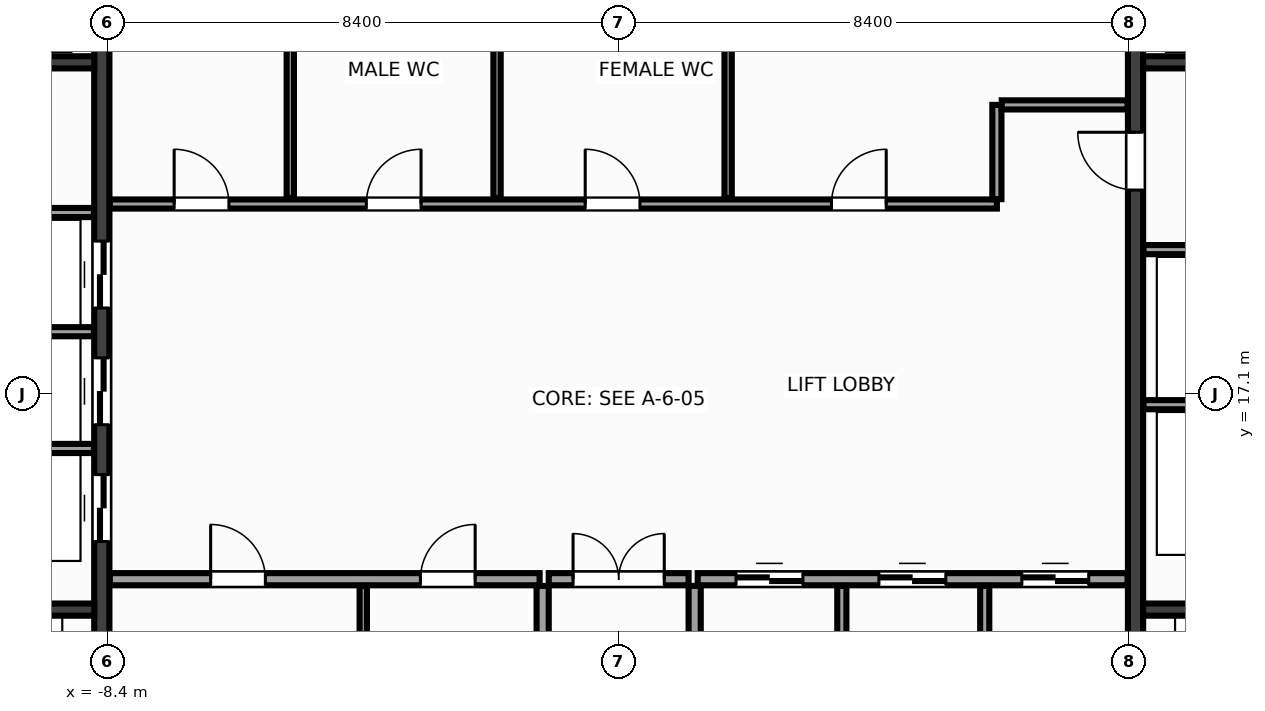
"""IFC4 building model, lengths in metres.
Left out: names, types, materials, properties, quantities, classifications, styles, units other than length and angle.
Written with IfcOpenShell. Run it as: python <this file> out.ifc"""

import sys

from ifc_helpers import new_model, si_unit, direction, frame, frame_2d, origin, place, context, subcontext, project, spatial, rectangle, extrude, source, transform, mapped, element, fill, save


model = new_model("IFC4")
c1 = context("Model", 3, precision=1e-05, world=origin(), true_north=direction((0.0, 1.0)))
c2 = subcontext(c1, "Body", "Model", "MODEL_VIEW")
j1 = project(units=[si_unit("LENGTHUNIT", "METRE"), si_unit("PLANEANGLEUNIT", "RADIAN")], contexts=[c1])
p1 = place(None, origin())
s1 = spatial("IfcSite", under=j1, at=p1, CompositionType="ELEMENT")
p2 = place(p1, origin())
s2 = spatial("IfcBuilding", under=s1, at=p2, CompositionType="ELEMENT")
p3 = place(p2, frame((0.0, 0.0, 160.4)))
s3 = spatial("IfcBuildingStorey", under=s2, at=p3, CompositionType="ELEMENT", Elevation=160.4)
m1 = source(origin(), c2, "Body", "SweptSolid", [
    extrude(rectangle(XDim=12.95, YDim=0.25, at=frame_2d((6.475, 0.0))), origin(), (0.0, 0.0, 1.0), 3.6),
])
p4 = place(p3, frame((-8.5, 10.525, 0.0), z_axis=(0.0, 0.0, 1.0), x_axis=(0.0, 1.0, 0.0)))
e1 = element("IfcWall", 1, at=p4, inside=s3, PredefinedType="SHEAR", context=c2, shape_type="MappedRepresentation", body=[
    mapped(m1, transform((0.0, 0.0, 0.0), x_axis=(1.0, 0.0, 0.0), y_axis=(0.0, 1.0, 0.0), z_axis=(0.0, 0.0, 1.0), scale=1.0)),
])
p5 = place(p4, frame((4.145, 0.0, 0.0)))
e2 = element("IfcOpeningElement", 2, at=p5, cuts=e1, PredefinedType="OPENING", context=c2, shape_type="SweptSolid", body=[
    extrude(rectangle(XDim=1.1, YDim=2.15, at=frame_2d((0.55, 1.075))), frame((0.0, 0.137, 0.0), z_axis=(0.0, -1.0, 0.0), x_axis=(1.0, 0.0, 0.0)), (0.0, 0.0, 1.0), 0.274),
])
p6 = place(p4, frame((6.065, 0.0, 0.0)))
e3 = element("IfcOpeningElement", 3, at=p6, cuts=e1, PredefinedType="OPENING", context=c2, shape_type="SweptSolid", body=[
    extrude(rectangle(XDim=1.1, YDim=2.15, at=frame_2d((0.55, 1.075))), frame((0.0, 0.137, 0.0), z_axis=(0.0, -1.0, 0.0), x_axis=(1.0, 0.0, 0.0)), (0.0, 0.0, 1.0), 0.274),
])
p7 = place(p4, frame((7.985, 0.0, 0.0)))
e4 = element("IfcOpeningElement", 4, at=p7, cuts=e1, PredefinedType="OPENING", context=c2, shape_type="SweptSolid", body=[
    extrude(rectangle(XDim=1.1, YDim=2.15, at=frame_2d((0.55, 1.075))), frame((0.0, 0.137, 0.0), z_axis=(0.0, -1.0, 0.0), x_axis=(1.0, 0.0, 0.0)), (0.0, 0.0, 1.0), 0.274),
])
p8 = place(p3, frame((8.5, 10.525, 0.0), z_axis=(0.0, 0.0, 1.0), x_axis=(0.0, 1.0, 0.0)))
e5 = element("IfcWall", 5, at=p8, inside=s3, PredefinedType="SHEAR", context=c2, shape_type="MappedRepresentation", body=[
    mapped(m1, transform((0.0, 0.0, 0.0), x_axis=(1.0, 0.0, 0.0), y_axis=(0.0, 1.0, 0.0), z_axis=(0.0, 0.0, 1.0), scale=1.0)),
])
p9 = place(p8, frame((9.925, 0.0, 0.0)))
e6 = element("IfcOpeningElement", 6, at=p9, cuts=e5, PredefinedType="OPENING", context=c2, shape_type="SweptSolid", body=[
    extrude(rectangle(XDim=0.95, YDim=2.15, at=frame_2d((0.475, 1.075))), frame((0.0, 0.137, 0.0), z_axis=(0.0, -1.0, 0.0), x_axis=(1.0, 0.0, 0.0)), (0.0, 0.0, 1.0), 0.274),
])
m2 = source(origin(), c2, "Body", "SweptSolid", [
    extrude(rectangle(XDim=2.825, YDim=0.2, at=frame_2d((1.413, 0.0))), origin(), (0.0, 0.0, 1.0), 3.6),
])
for number, where, z_axis, x_axis in (
    (7, (-11.45, 13.55, 0.0), (0.0, 0.0, 1.0), (1.0, 0.0, 0.0)),
    (8, (8.625, 13.55, 0.0), (0.0, 0.0, 1.0), (1.0, 0.0, 0.0)),
):
    element("IfcWall", number, at=place(p3, frame(where, z_axis=z_axis, x_axis=x_axis)), inside=s3, PredefinedType="SHEAR", context=c2, shape_type="MappedRepresentation", body=[
        mapped(m2, transform((0.0, 0.0, 0.0), x_axis=(1.0, 0.0, 0.0), y_axis=(0.0, 1.0, 0.0), z_axis=(0.0, 0.0, 1.0), scale=1.0)),
    ])
m3 = source(origin(), c2, "Body", "SweptSolid", [
    extrude(rectangle(XDim=3.02, YDim=0.2, at=frame_2d((1.51, 0.0))), origin(), (0.0, 0.0, 1.0), 3.6),
])
for number, where, z_axis, x_axis in (
    (9, (-11.645, 22.55, 0.0), (0.0, 0.0, 1.0), (1.0, 0.0, 0.0)),
    (10, (8.625, 22.55, 0.0), (0.0, 0.0, 1.0), (1.0, 0.0, 0.0)),
):
    element("IfcWall", number, at=place(p3, frame(where, z_axis=z_axis, x_axis=x_axis)), inside=s3, PredefinedType="SHEAR", context=c2, shape_type="MappedRepresentation", body=[
        mapped(m3, transform((0.0, 0.0, 0.0), x_axis=(1.0, 0.0, 0.0), y_axis=(0.0, 1.0, 0.0), z_axis=(0.0, 0.0, 1.0), scale=1.0)),
    ])
m4 = source(origin(), c2, "Body", "SweptSolid", [
    extrude(rectangle(XDim=3.01, YDim=0.15, at=frame_2d((1.505, 0.0))), origin(), (0.0, 0.0, 1.0), 3.38),
])
for number, where, z_axis, x_axis in (
    (11, (-11.64, 16.2, 0.0), (0.0, 0.0, 1.0), (1.0, 0.0, 0.0)),
    (12, (-11.64, 18.12, 0.0), (0.0, 0.0, 1.0), (1.0, 0.0, 0.0)),
    (13, (-11.64, 20.08, 0.0), (0.0, 0.0, 1.0), (1.0, 0.0, 0.0)),
    (14, (8.63, 16.92, 0.0), (0.0, 0.0, 1.0), (1.0, 0.0, 0.0)),
    (15, (8.63, 19.47, 0.0), (0.0, 0.0, 1.0), (1.0, 0.0, 0.0)),
):
    element("IfcWall", number, at=place(p3, frame(where, z_axis=z_axis, x_axis=x_axis)), inside=s3, PredefinedType="PARTITIONING", context=c2, shape_type="MappedRepresentation", body=[
        mapped(m4, transform((0.0, 0.0, 0.0), x_axis=(1.0, 0.0, 0.0), y_axis=(0.0, 1.0, 0.0), z_axis=(0.0, 0.0, 1.0), scale=1.0)),
    ])
m5 = source(origin(), c2, "Body", "SweptSolid", [
    extrude(rectangle(XDim=7.07, YDim=0.2, at=frame_2d((3.535, 0.0))), origin(), (0.0, 0.0, 1.0), 3.38),
])
p10 = place(p3, frame((-8.37, 14.05, 0.0), z_axis=(0.0, 0.0, 1.0), x_axis=(1.0, 0.0, 0.0)))
e16 = element("IfcWall", 16, at=p10, inside=s3, PredefinedType="PARTITIONING", context=c2, shape_type="MappedRepresentation", body=[
    mapped(m5, transform((0.0, 0.0, 0.0), x_axis=(1.0, 0.0, 0.0), y_axis=(0.0, 1.0, 0.0), z_axis=(0.0, 0.0, 1.0), scale=1.0)),
])
p11 = place(p10, frame((1.66, 0.0, 0.0)))
e17 = element("IfcOpeningElement", 17, at=p11, cuts=e16, PredefinedType="OPENING", context=c2, shape_type="SweptSolid", body=[
    extrude(rectangle(XDim=0.9, YDim=2.15, at=frame_2d((0.45, 1.075))), frame((0.0, 0.112, 0.0), z_axis=(0.0, -1.0, 0.0), x_axis=(1.0, 0.0, 0.0)), (0.0, 0.0, 1.0), 0.224),
])
p12 = place(p10, frame((5.11, 0.0, 0.0)))
e18 = element("IfcOpeningElement", 18, at=p12, cuts=e16, PredefinedType="OPENING", context=c2, shape_type="SweptSolid", body=[
    extrude(rectangle(XDim=0.9, YDim=2.15, at=frame_2d((0.45, 1.075))), frame((0.0, 0.112, 0.0), z_axis=(0.0, -1.0, 0.0), x_axis=(1.0, 0.0, 0.0)), (0.0, 0.0, 1.0), 0.224),
])
p13 = place(p3, frame((1.3, 14.05, 0.0), z_axis=(0.0, 0.0, 1.0), x_axis=(1.0, 0.0, 0.0)))
e19 = element("IfcWall", 19, at=p13, inside=s3, PredefinedType="PARTITIONING", context=c2, shape_type="MappedRepresentation", body=[
    mapped(m5, transform((0.0, 0.0, 0.0), x_axis=(1.0, 0.0, 0.0), y_axis=(0.0, 1.0, 0.0), z_axis=(0.0, 0.0, 1.0), scale=1.0)),
])
p14 = place(p13, frame((0.63, 0.0, 0.0)))
e20 = element("IfcOpeningElement", 20, at=p14, cuts=e19, PredefinedType="OPENING", context=c2, shape_type="SweptSolid", body=[
    extrude(rectangle(XDim=1.1, YDim=2.15, at=frame_2d((0.55, 1.075))), frame((0.0, 0.112, 0.0), z_axis=(0.0, -1.0, 0.0), x_axis=(1.0, 0.0, 0.0)), (0.0, 0.0, 1.0), 0.224),
])
p15 = place(p13, frame((2.98, 0.0, 0.0)))
e21 = element("IfcOpeningElement", 21, at=p15, cuts=e19, PredefinedType="OPENING", context=c2, shape_type="SweptSolid", body=[
    extrude(rectangle(XDim=1.1, YDim=2.15, at=frame_2d((0.55, 1.075))), frame((0.0, 0.112, 0.0), z_axis=(0.0, -1.0, 0.0), x_axis=(1.0, 0.0, 0.0)), (0.0, 0.0, 1.0), 0.224),
])
p16 = place(p13, frame((5.33, 0.0, 0.0)))
e22 = element("IfcOpeningElement", 22, at=p16, cuts=e19, PredefinedType="OPENING", context=c2, shape_type="SweptSolid", body=[
    extrude(rectangle(XDim=1.1, YDim=2.15, at=frame_2d((0.55, 1.075))), frame((0.0, 0.112, 0.0), z_axis=(0.0, -1.0, 0.0), x_axis=(1.0, 0.0, 0.0)), (0.0, 0.0, 1.0), 0.224),
])
m6 = source(origin(), c2, "Body", "SweptSolid", [
    extrude(rectangle(XDim=3.415, YDim=0.2, at=frame_2d((1.708, 0.0))), origin(), (0.0, 0.0, 1.0), 3.38),
])
for number, where, z_axis, x_axis in (
    (23, (-1.25, 10.525, 0.0), (0.0, 0.0, 1.0), (0.0, 1.0, 0.0)),
    (24, (1.25, 10.525, 0.0), (0.0, 0.0, 1.0), (0.0, 1.0, 0.0)),
):
    element("IfcWall", number, at=place(p3, frame(where, z_axis=z_axis, x_axis=x_axis)), inside=s3, PredefinedType="PARTITIONING", context=c2, shape_type="MappedRepresentation", body=[
        mapped(m6, transform((0.0, 0.0, 0.0), x_axis=(1.0, 0.0, 0.0), y_axis=(0.0, 1.0, 0.0), z_axis=(0.0, 0.0, 1.0), scale=1.0)),
    ])
m7 = source(origin(), c2, "Body", "SweptSolid", [
    extrude(rectangle(XDim=2.3, YDim=0.2, at=frame_2d((1.15, 0.0))), origin(), (0.0, 0.0, 1.0), 3.38),
])
p17 = place(p3, frame((-1.15, 14.05, 0.0), z_axis=(0.0, 0.0, 1.0), x_axis=(1.0, 0.0, 0.0)))
e25 = element("IfcWall", 25, at=p17, inside=s3, PredefinedType="PARTITIONING", context=c2, shape_type="MappedRepresentation", body=[
    mapped(m7, transform((0.0, 0.0, 0.0), x_axis=(1.0, 0.0, 0.0), y_axis=(0.0, 1.0, 0.0), z_axis=(0.0, 0.0, 1.0), scale=1.0)),
])
p18 = place(p17, frame((0.4, 0.0, 0.0)))
e26 = element("IfcOpeningElement", 26, at=p18, cuts=e25, PredefinedType="OPENING", context=c2, shape_type="SweptSolid", body=[
    extrude(rectangle(XDim=1.5, YDim=2.2, at=frame_2d((0.75, 1.1))), frame((0.0, 0.112, 0.0), z_axis=(0.0, -1.0, 0.0), x_axis=(1.0, 0.0, 0.0)), (0.0, 0.0, 1.0), 0.224),
])
m8 = source(origin(), c2, "Body", "SweptSolid", [
    extrude(rectangle(XDim=14.59, YDim=0.15, at=frame_2d((7.295, 0.0))), origin(), (0.0, 0.0, 1.0), 3.38),
])
p19 = place(p3, frame((-8.37, 20.22, 0.0), z_axis=(0.0, 0.0, 1.0), x_axis=(1.0, 0.0, 0.0)))
e27 = element("IfcWall", 27, at=p19, inside=s3, PredefinedType="PARTITIONING", context=c2, shape_type="MappedRepresentation", body=[
    mapped(m8, transform((0.0, 0.0, 0.0), x_axis=(1.0, 0.0, 0.0), y_axis=(0.0, 1.0, 0.0), z_axis=(0.0, 0.0, 1.0), scale=1.0)),
])
p20 = place(p19, frame((1.06, 0.0, 0.0)))
e28 = element("IfcOpeningElement", 28, at=p20, cuts=e27, PredefinedType="OPENING", context=c2, shape_type="SweptSolid", body=[
    extrude(rectangle(XDim=0.9, YDim=2.15, at=frame_2d((0.45, 1.075))), frame((0.0, 0.087, 0.0), z_axis=(0.0, -1.0, 0.0), x_axis=(1.0, 0.0, 0.0)), (0.0, 0.0, 1.0), 0.174),
])
p21 = place(p19, frame((4.22, 0.0, 0.0)))
e29 = element("IfcOpeningElement", 29, at=p21, cuts=e27, PredefinedType="OPENING", context=c2, shape_type="SweptSolid", body=[
    extrude(rectangle(XDim=0.9, YDim=2.15, at=frame_2d((0.45, 1.075))), frame((0.0, 0.087, 0.0), z_axis=(0.0, -1.0, 0.0), x_axis=(1.0, 0.0, 0.0)), (0.0, 0.0, 1.0), 0.174),
])
p22 = place(p19, frame((7.82, 0.0, 0.0)))
e30 = element("IfcOpeningElement", 30, at=p22, cuts=e27, PredefinedType="OPENING", context=c2, shape_type="SweptSolid", body=[
    extrude(rectangle(XDim=0.9, YDim=2.15, at=frame_2d((0.45, 1.075))), frame((0.0, 0.087, 0.0), z_axis=(0.0, -1.0, 0.0), x_axis=(1.0, 0.0, 0.0)), (0.0, 0.0, 1.0), 0.174),
])
p23 = place(p19, frame((11.87, 0.0, 0.0)))
e31 = element("IfcOpeningElement", 31, at=p23, cuts=e27, PredefinedType="OPENING", context=c2, shape_type="SweptSolid", body=[
    extrude(rectangle(XDim=0.9, YDim=2.15, at=frame_2d((0.45, 1.075))), frame((0.0, 0.087, 0.0), z_axis=(0.0, -1.0, 0.0), x_axis=(1.0, 0.0, 0.0)), (0.0, 0.0, 1.0), 0.174),
])
m9 = source(origin(), c2, "Body", "SweptSolid", [
    extrude(rectangle(XDim=1.55, YDim=0.15, at=frame_2d((0.775, 0.0))), origin(), (0.0, 0.0, 1.0), 3.38),
])
p24 = place(p3, frame((6.22, 20.3, 0.0), z_axis=(0.0, 0.0, 1.0), x_axis=(0.0, 1.0, 0.0)))
e32 = element("IfcWall", 32, at=p24, inside=s3, PredefinedType="PARTITIONING", context=c2, shape_type="MappedRepresentation", body=[
    mapped(m9, transform((0.0, 0.0, 0.0), x_axis=(1.0, 0.0, 0.0), y_axis=(0.0, 1.0, 0.0), z_axis=(0.0, 0.0, 1.0), scale=1.0)),
])
m10 = source(origin(), c2, "Body", "SweptSolid", [
    extrude(rectangle(XDim=2.07, YDim=0.15, at=frame_2d((1.035, 0.0))), origin(), (0.0, 0.0, 1.0), 3.38),
])
p25 = place(p3, frame((6.3, 21.85, 0.0), z_axis=(0.0, 0.0, 1.0), x_axis=(1.0, 0.0, 0.0)))
e33 = element("IfcWall", 33, at=p25, inside=s3, PredefinedType="PARTITIONING", context=c2, shape_type="MappedRepresentation", body=[
    mapped(m10, transform((0.0, 0.0, 0.0), x_axis=(1.0, 0.0, 0.0), y_axis=(0.0, 1.0, 0.0), z_axis=(0.0, 0.0, 1.0), scale=1.0)),
])
m11 = source(origin(), c2, "Body", "SweptSolid", [
    extrude(rectangle(XDim=3.415, YDim=0.12, at=frame_2d((1.708, 0.0))), origin(), (0.0, 0.0, 1.0), 3.38),
])
p26 = place(p3, frame((-4.2, 10.525, 0.0), z_axis=(0.0, 0.0, 1.0), x_axis=(0.0, 1.0, 0.0)))
e34 = element("IfcWall", 34, at=p26, inside=s3, PredefinedType="PARTITIONING", context=c2, shape_type="MappedRepresentation", body=[
    mapped(m11, transform((0.0, 0.0, 0.0), x_axis=(1.0, 0.0, 0.0), y_axis=(0.0, 1.0, 0.0), z_axis=(0.0, 0.0, 1.0), scale=1.0)),
])
m12 = source(origin(), c2, "Body", "SweptSolid", [
    extrude(rectangle(XDim=3.415, YDim=0.15, at=frame_2d((1.708, 0.0))), origin(), (0.0, 0.0, 1.0), 3.38),
])
for number, where, z_axis, x_axis in (
    (35, (3.67, 10.525, 0.0), (0.0, 0.0, 1.0), (0.0, 1.0, 0.0)),
    (36, (6.02, 10.525, 0.0), (0.0, 0.0, 1.0), (0.0, 1.0, 0.0)),
):
    element("IfcWall", number, at=place(p3, frame(where, z_axis=z_axis, x_axis=x_axis)), inside=s3, PredefinedType="PARTITIONING", context=c2, shape_type="MappedRepresentation", body=[
        mapped(m12, transform((0.0, 0.0, 0.0), x_axis=(1.0, 0.0, 0.0), y_axis=(0.0, 1.0, 0.0), z_axis=(0.0, 0.0, 1.0), scale=1.0)),
    ])
m13 = source(origin(), c2, "Body", "SweptSolid", [
    extrude(rectangle(XDim=3.115, YDim=0.12, at=frame_2d((1.558, 0.0))), origin(), (0.0, 0.0, 1.0), 3.38),
])
for number, where, z_axis, x_axis in (
    (37, (-5.4, 20.32, 0.0), (0.0, 0.0, 1.0), (0.0, 1.0, 0.0)),
    (38, (-2.0, 20.32, 0.0), (0.0, 0.0, 1.0), (0.0, 1.0, 0.0)),
    (39, (1.8, 20.32, 0.0), (0.0, 0.0, 1.0), (0.0, 1.0, 0.0)),
):
    element("IfcWall", number, at=place(p3, frame(where, z_axis=z_axis, x_axis=x_axis)), inside=s3, PredefinedType="PARTITIONING", context=c2, shape_type="MappedRepresentation", body=[
        mapped(m13, transform((0.0, 0.0, 0.0), x_axis=(1.0, 0.0, 0.0), y_axis=(0.0, 1.0, 0.0), z_axis=(0.0, 0.0, 1.0), scale=1.0)),
    ])
m14 = source(origin(), c2, "Body", "SweptSolid", [
    extrude(rectangle(XDim=1.1, YDim=2.15, at=frame_2d((0.55, 1.075))), frame((0.0, 0.025, 0.0), z_axis=(0.0, -1.0, 0.0), x_axis=(1.0, 0.0, 0.0)), (0.0, 0.0, 1.0), 0.05),
])
p27 = place(p5, origin())
e40 = element("IfcDoor", 40, at=p27, inside=s3, OperationType="DOUBLE_DOOR_SLIDING", PredefinedType="DOOR", context=c2, shape_type="MappedRepresentation", body=[
    mapped(m14, transform((0.0, 0.0, 0.0), x_axis=(1.0, 0.0, 0.0), y_axis=(0.0, 1.0, 0.0), z_axis=(0.0, 0.0, 1.0), scale=1.0)),
])
fill(e2, e40)
p28 = place(p6, origin())
e41 = element("IfcDoor", 41, at=p28, inside=s3, OperationType="DOUBLE_DOOR_SLIDING", PredefinedType="DOOR", context=c2, shape_type="MappedRepresentation", body=[
    mapped(m14, transform((0.0, 0.0, 0.0), x_axis=(1.0, 0.0, 0.0), y_axis=(0.0, 1.0, 0.0), z_axis=(0.0, 0.0, 1.0), scale=1.0)),
])
fill(e3, e41)
p29 = place(p7, origin())
e42 = element("IfcDoor", 42, at=p29, inside=s3, OperationType="DOUBLE_DOOR_SLIDING", PredefinedType="DOOR", context=c2, shape_type="MappedRepresentation", body=[
    mapped(m14, transform((0.0, 0.0, 0.0), x_axis=(1.0, 0.0, 0.0), y_axis=(0.0, 1.0, 0.0), z_axis=(0.0, 0.0, 1.0), scale=1.0)),
])
fill(e4, e42)
m15 = source(origin(), c2, "Body", "SweptSolid", [
    extrude(rectangle(XDim=0.95, YDim=2.15, at=frame_2d((0.475, 1.075))), frame((0.0, 0.025, 0.0), z_axis=(0.0, -1.0, 0.0), x_axis=(1.0, 0.0, 0.0)), (0.0, 0.0, 1.0), 0.05),
])
p30 = place(p9, origin())
e43 = element("IfcDoor", 43, at=p30, inside=s3, OperationType="SINGLE_SWING_RIGHT", PredefinedType="DOOR", context=c2, shape_type="MappedRepresentation", body=[
    mapped(m15, transform((0.0, 0.0, 0.0), x_axis=(1.0, 0.0, 0.0), y_axis=(0.0, 1.0, 0.0), z_axis=(0.0, 0.0, 1.0), scale=1.0)),
])
fill(e6, e43)
m16 = source(origin(), c2, "Body", "SweptSolid", [
    extrude(rectangle(XDim=0.9, YDim=2.15, at=frame_2d((0.45, 1.075))), frame((0.0, 0.025, 0.0), z_axis=(0.0, -1.0, 0.0), x_axis=(1.0, 0.0, 0.0)), (0.0, 0.0, 1.0), 0.05),
])
p31 = place(p11, origin())
e44 = element("IfcDoor", 44, at=p31, inside=s3, OperationType="SINGLE_SWING_LEFT", PredefinedType="DOOR", context=c2, shape_type="MappedRepresentation", body=[
    mapped(m16, transform((0.0, 0.0, 0.0), x_axis=(1.0, 0.0, 0.0), y_axis=(0.0, 1.0, 0.0), z_axis=(0.0, 0.0, 1.0), scale=1.0)),
])
fill(e17, e44)
p32 = place(p12, origin())
e45 = element("IfcDoor", 45, at=p32, inside=s3, OperationType="SINGLE_SWING_RIGHT", PredefinedType="DOOR", context=c2, shape_type="MappedRepresentation", body=[
    mapped(m16, transform((0.0, 0.0, 0.0), x_axis=(1.0, 0.0, 0.0), y_axis=(0.0, 1.0, 0.0), z_axis=(0.0, 0.0, 1.0), scale=1.0)),
])
fill(e18, e45)
p33 = place(p14, origin())
e46 = element("IfcDoor", 46, at=p33, inside=s3, OperationType="DOUBLE_DOOR_SLIDING", PredefinedType="DOOR", context=c2, shape_type="MappedRepresentation", body=[
    mapped(m14, transform((0.0, 0.0, 0.0), x_axis=(1.0, 0.0, 0.0), y_axis=(0.0, 1.0, 0.0), z_axis=(0.0, 0.0, 1.0), scale=1.0)),
])
fill(e20, e46)
p34 = place(p15, origin())
e47 = element("IfcDoor", 47, at=p34, inside=s3, OperationType="DOUBLE_DOOR_SLIDING", PredefinedType="DOOR", context=c2, shape_type="MappedRepresentation", body=[
    mapped(m14, transform((0.0, 0.0, 0.0), x_axis=(1.0, 0.0, 0.0), y_axis=(0.0, 1.0, 0.0), z_axis=(0.0, 0.0, 1.0), scale=1.0)),
])
fill(e21, e47)
p35 = place(p16, origin())
e48 = element("IfcDoor", 48, at=p35, inside=s3, OperationType="DOUBLE_DOOR_SLIDING", PredefinedType="DOOR", context=c2, shape_type="MappedRepresentation", body=[
    mapped(m14, transform((0.0, 0.0, 0.0), x_axis=(1.0, 0.0, 0.0), y_axis=(0.0, 1.0, 0.0), z_axis=(0.0, 0.0, 1.0), scale=1.0)),
])
fill(e22, e48)
m17 = source(origin(), c2, "Body", "SweptSolid", [
    extrude(rectangle(XDim=1.5, YDim=2.2, at=frame_2d((0.75, 1.1))), frame((0.0, 0.025, 0.0), z_axis=(0.0, -1.0, 0.0), x_axis=(1.0, 0.0, 0.0)), (0.0, 0.0, 1.0), 0.05),
])
p36 = place(p18, origin())
e49 = element("IfcDoor", 49, at=p36, inside=s3, OperationType="DOUBLE_DOOR_SINGLE_SWING", PredefinedType="DOOR", context=c2, shape_type="MappedRepresentation", body=[
    mapped(m17, transform((0.0, 0.0, 0.0), x_axis=(1.0, 0.0, 0.0), y_axis=(0.0, 1.0, 0.0), z_axis=(0.0, 0.0, 1.0), scale=1.0)),
])
fill(e26, e49)
p37 = place(p20, origin())
e50 = element("IfcDoor", 50, at=p37, inside=s3, OperationType="SINGLE_SWING_LEFT", PredefinedType="DOOR", context=c2, shape_type="MappedRepresentation", body=[
    mapped(m16, transform((0.0, 0.0, 0.0), x_axis=(1.0, 0.0, 0.0), y_axis=(0.0, 1.0, 0.0), z_axis=(0.0, 0.0, 1.0), scale=1.0)),
])
fill(e28, e50)
p38 = place(p21, origin())
e51 = element("IfcDoor", 51, at=p38, inside=s3, OperationType="SINGLE_SWING_RIGHT", PredefinedType="DOOR", context=c2, shape_type="MappedRepresentation", body=[
    mapped(m16, transform((0.0, 0.0, 0.0), x_axis=(1.0, 0.0, 0.0), y_axis=(0.0, 1.0, 0.0), z_axis=(0.0, 0.0, 1.0), scale=1.0)),
])
fill(e29, e51)
p39 = place(p22, origin())
e52 = element("IfcDoor", 52, at=p39, inside=s3, OperationType="SINGLE_SWING_LEFT", PredefinedType="DOOR", context=c2, shape_type="MappedRepresentation", body=[
    mapped(m16, transform((0.0, 0.0, 0.0), x_axis=(1.0, 0.0, 0.0), y_axis=(0.0, 1.0, 0.0), z_axis=(0.0, 0.0, 1.0), scale=1.0)),
])
fill(e30, e52)
p40 = place(p23, origin())
e53 = element("IfcDoor", 53, at=p40, inside=s3, OperationType="SINGLE_SWING_RIGHT", PredefinedType="DOOR", context=c2, shape_type="MappedRepresentation", body=[
    mapped(m16, transform((0.0, 0.0, 0.0), x_axis=(1.0, 0.0, 0.0), y_axis=(0.0, 1.0, 0.0), z_axis=(0.0, 0.0, 1.0), scale=1.0)),
])
fill(e31, e53)
save(model, sys.argv[1])
